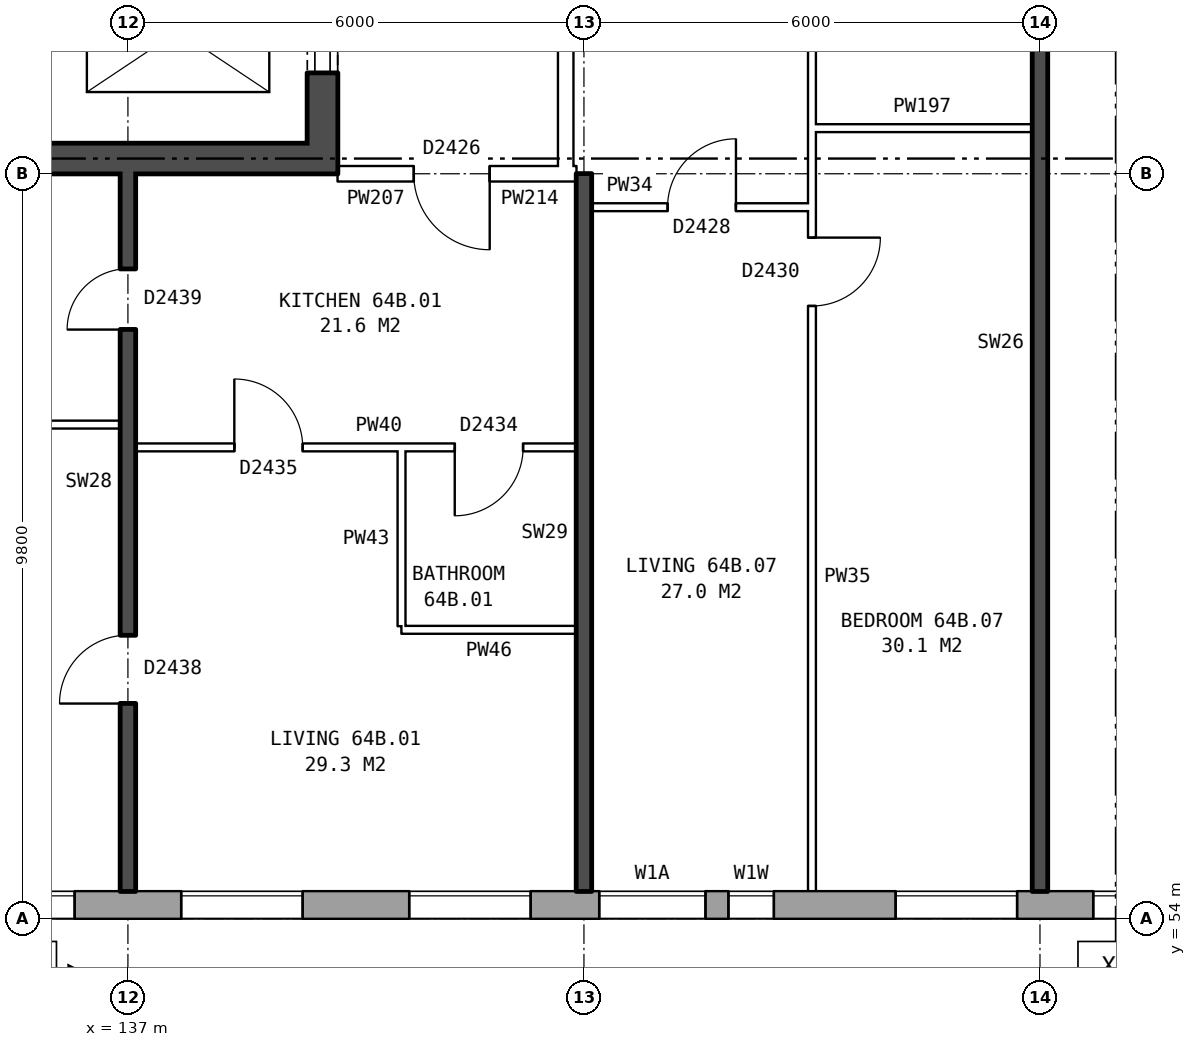
"""IFC4 building model, lengths in metres.
Left out: names, types, materials, properties, quantities, classifications, styles, units other than length and angle.
Written with IfcOpenShell. Run it as: python <this file> out.ifc"""

import sys

from ifc_helpers import new_model, si_unit, direction, frame, frame_2d, origin, place, context, subcontext, project, spatial, rectangle, extrude, element, fill, save


model = new_model("IFC4")
c1 = context("Model", 3, precision=1e-05, world=origin(), true_north=direction((0.0, 1.0)))
c2 = subcontext(c1, "Body", "Model", "MODEL_VIEW")
j1 = project(units=[si_unit("LENGTHUNIT", "METRE"), si_unit("PLANEANGLEUNIT", "RADIAN")], contexts=[c1])
p1 = place(None, origin())
s1 = spatial("IfcSite", under=j1, at=p1, CompositionType="ELEMENT")
p2 = place(p1, origin())
s2 = spatial("IfcBuilding", under=s1, at=p2, CompositionType="ELEMENT")
p3 = place(p2, frame((0.0, 0.0, 227.6)))
s3 = spatial("IfcBuildingStorey", under=s2, at=p3, CompositionType="ELEMENT", Elevation=227.6)
p4 = place(p3, frame((132.05, 54.18, 0.0), z_axis=(0.0, 0.0, 1.0), x_axis=(1.0, 0.0, 0.0)))
e1 = element("IfcWall", 1, at=p4, inside=s3, PredefinedType="STANDARD", context=c2, shape_type="SweptSolid", body=[
    extrude(rectangle(XDim=33.875, YDim=0.36, at=frame_2d((16.938, 0.0))), origin(), (0.0, 0.0, 1.0), 2.85),
])
p5 = place(p4, frame((2.65, 0.0, 0.8)))
e2 = element("IfcOpeningElement", 2, at=p5, cuts=e1, PredefinedType="OPENING", context=c2, shape_type="SweptSolid", body=[
    extrude(rectangle(XDim=1.6, YDim=1.8, at=frame_2d((0.8, 0.9))), frame((0.0, 0.19, 0.0), z_axis=(0.0, -1.0, 0.0), x_axis=(1.0, 0.0, 0.0)), (0.0, 0.0, 1.0), 0.38),
])
p6 = place(p4, frame((5.65, 0.0, 0.8)))
e3 = element("IfcOpeningElement", 3, at=p6, cuts=e1, PredefinedType="OPENING", context=c2, shape_type="SweptSolid", body=[
    extrude(rectangle(XDim=1.6, YDim=1.8, at=frame_2d((0.8, 0.9))), frame((0.0, 0.19, 0.0), z_axis=(0.0, -1.0, 0.0), x_axis=(1.0, 0.0, 0.0)), (0.0, 0.0, 1.0), 0.38),
])
p7 = place(p4, frame((8.65, 0.0, 0.8)))
e4 = element("IfcOpeningElement", 4, at=p7, cuts=e1, PredefinedType="OPENING", context=c2, shape_type="SweptSolid", body=[
    extrude(rectangle(XDim=1.6, YDim=1.8, at=frame_2d((0.8, 0.9))), frame((0.0, 0.19, 0.0), z_axis=(0.0, -1.0, 0.0), x_axis=(1.0, 0.0, 0.0)), (0.0, 0.0, 1.0), 0.38),
])
p8 = place(p4, frame((11.15, 0.0, 0.8)))
e5 = element("IfcOpeningElement", 5, at=p8, cuts=e1, PredefinedType="OPENING", context=c2, shape_type="SweptSolid", body=[
    extrude(rectangle(XDim=1.4, YDim=1.8, at=frame_2d((0.7, 0.9))), frame((0.0, 0.19, 0.0), z_axis=(0.0, -1.0, 0.0), x_axis=(1.0, 0.0, 0.0)), (0.0, 0.0, 1.0), 0.38),
])
p9 = place(p4, frame((15.05, 0.0, 0.8)))
e6 = element("IfcOpeningElement", 6, at=p9, cuts=e1, PredefinedType="OPENING", context=c2, shape_type="SweptSolid", body=[
    extrude(rectangle(XDim=1.6, YDim=1.8, at=frame_2d((0.8, 0.9))), frame((0.0, 0.19, 0.0), z_axis=(0.0, -1.0, 0.0), x_axis=(1.0, 0.0, 0.0)), (0.0, 0.0, 1.0), 0.38),
])
p10 = place(p4, frame((17.65, 0.0, 0.8)))
e7 = element("IfcOpeningElement", 7, at=p10, cuts=e1, PredefinedType="OPENING", context=c2, shape_type="SweptSolid", body=[
    extrude(rectangle(XDim=1.6, YDim=1.8, at=frame_2d((0.8, 0.9))), frame((0.0, 0.19, 0.0), z_axis=(0.0, -1.0, 0.0), x_axis=(1.0, 0.0, 0.0)), (0.0, 0.0, 1.0), 0.38),
])
p11 = place(p4, frame((20.1, 0.0, 0.35)))
e8 = element("IfcOpeningElement", 8, at=p11, cuts=e1, PredefinedType="OPENING", context=c2, shape_type="SweptSolid", body=[
    extrude(rectangle(XDim=1.0, YDim=1.8, at=frame_2d((0.5, 0.9))), frame((0.0, 0.19, 0.0), z_axis=(0.0, -1.0, 0.0), x_axis=(1.0, 0.0, 0.0)), (0.0, 0.0, 1.0), 0.38),
])
p12 = place(p4, frame((23.65, 0.0, 0.8)))
e9 = element("IfcOpeningElement", 9, at=p12, cuts=e1, PredefinedType="OPENING", context=c2, shape_type="SweptSolid", body=[
    extrude(rectangle(XDim=1.6, YDim=1.8, at=frame_2d((0.8, 0.9))), frame((0.0, 0.19, 0.0), z_axis=(0.0, -1.0, 0.0), x_axis=(1.0, 0.0, 0.0)), (0.0, 0.0, 1.0), 0.38),
])
p13 = place(p4, frame((26.65, 0.0, 0.8)))
e10 = element("IfcOpeningElement", 10, at=p13, cuts=e1, PredefinedType="OPENING", context=c2, shape_type="SweptSolid", body=[
    extrude(rectangle(XDim=1.6, YDim=1.8, at=frame_2d((0.8, 0.9))), frame((0.0, 0.19, 0.0), z_axis=(0.0, -1.0, 0.0), x_axis=(1.0, 0.0, 0.0)), (0.0, 0.0, 1.0), 0.38),
])
p14 = place(p4, frame((29.65, 0.0, 0.8)))
e11 = element("IfcOpeningElement", 11, at=p14, cuts=e1, PredefinedType="OPENING", context=c2, shape_type="SweptSolid", body=[
    extrude(rectangle(XDim=1.6, YDim=1.8, at=frame_2d((0.8, 0.9))), frame((0.0, 0.19, 0.0), z_axis=(0.0, -1.0, 0.0), x_axis=(1.0, 0.0, 0.0)), (0.0, 0.0, 1.0), 0.38),
])
p15 = place(p4, frame((12.85, 0.0, 1.7)))
e12 = element("IfcOpeningElement", 12, at=p15, cuts=e1, PredefinedType="OPENING", context=c2, shape_type="SweptSolid", body=[
    extrude(rectangle(XDim=0.6, YDim=0.9, at=frame_2d((0.3, 0.45))), frame((0.0, 0.19, 0.0), z_axis=(0.0, -1.0, 0.0), x_axis=(1.0, 0.0, 0.0)), (0.0, 0.0, 1.0), 0.38),
])
p16 = place(p3, frame((139.56, 63.8, 0.0), z_axis=(0.0, 0.0, 1.0), x_axis=(0.0, 1.0, 0.0)))
e13 = element("IfcWall", 13, at=p16, inside=s3, PredefinedType="SHEAR", context=c2, shape_type="SweptSolid", body=[
    extrude(rectangle(XDim=12.4, YDim=0.4, at=frame_2d((6.2, 0.0))), origin(), (0.0, 0.0, 1.0), 2.85),
])
p17 = place(p16, frame((1.325, 0.0, 0.0)))
e14 = element("IfcOpeningElement", 14, at=p17, cuts=e13, PredefinedType="OPENING", context=c2, shape_type="SweptSolid", body=[
    extrude(rectangle(XDim=1.1, YDim=2.1, at=frame_2d((0.55, 1.05))), frame((0.0, 0.21, 0.0), z_axis=(0.0, -1.0, 0.0), x_axis=(1.0, 0.0, 0.0)), (0.0, 0.0, 1.0), 0.42),
])
p18 = place(p16, frame((3.6, 0.0, 0.0)))
e15 = element("IfcOpeningElement", 15, at=p18, cuts=e13, PredefinedType="OPENING", context=c2, shape_type="SweptSolid", body=[
    extrude(rectangle(XDim=1.1, YDim=2.1, at=frame_2d((0.55, 1.05))), frame((0.0, 0.21, 0.0), z_axis=(0.0, -1.0, 0.0), x_axis=(1.0, 0.0, 0.0)), (0.0, 0.0, 1.0), 0.42),
])
p19 = place(p16, frame((5.8, 0.0, 0.0)))
e16 = element("IfcOpeningElement", 16, at=p19, cuts=e13, PredefinedType="OPENING", context=c2, shape_type="SweptSolid", body=[
    extrude(rectangle(XDim=1.1, YDim=2.1, at=frame_2d((0.55, 1.05))), frame((0.0, 0.21, 0.0), z_axis=(0.0, -1.0, 0.0), x_axis=(1.0, 0.0, 0.0)), (0.0, 0.0, 1.0), 0.42),
])
p20 = place(p16, frame((9.9, 0.0, 0.0)))
e17 = element("IfcOpeningElement", 17, at=p20, cuts=e13, PredefinedType="OPENING", context=c2, shape_type="SweptSolid", body=[
    extrude(rectangle(XDim=1.1, YDim=2.1, at=frame_2d((0.55, 1.05))), frame((0.0, 0.21, 0.0), z_axis=(0.0, -1.0, 0.0), x_axis=(1.0, 0.0, 0.0)), (0.0, 0.0, 1.0), 0.42),
])
p21 = place(p16, frame((8.125, 0.0, 0.0)))
e18 = element("IfcOpeningElement", 18, at=p21, cuts=e13, PredefinedType="OPENING", context=c2, shape_type="SweptSolid", body=[
    extrude(rectangle(XDim=0.85, YDim=2.1, at=frame_2d((0.425, 1.05))), frame((0.0, 0.21, 0.0), z_axis=(0.0, -1.0, 0.0), x_axis=(1.0, 0.0, 0.0)), (0.0, 0.0, 1.0), 0.42),
])
p22 = place(p3, frame((139.36, 64.0, 0.0), z_axis=(0.0, 0.0, 1.0), x_axis=(-1.0, 0.0, 0.0)))
e19 = element("IfcWall", 19, at=p22, inside=s3, PredefinedType="SHEAR", context=c2, shape_type="SweptSolid", body=[
    extrude(rectangle(XDim=7.6, YDim=0.4, at=frame_2d((3.8, 0.0))), origin(), (0.0, 0.0, 1.0), 2.85),
])
p23 = place(p3, frame((142.76, 63.9, 0.0), z_axis=(0.0, 0.0, 1.0), x_axis=(0.0, 1.0, 0.0)))
e20 = element("IfcWall", 20, at=p23, inside=s3, PredefinedType="PARTITIONING", context=c2, shape_type="SweptSolid", body=[
    extrude(rectangle(XDim=12.2, YDim=0.2, at=frame_2d((6.1, 0.0))), origin(), (0.0, 0.0, 1.0), 2.85),
])
p24 = place(p23, frame((5.1, 0.0, 0.0)))
e21 = element("IfcOpeningElement", 21, at=p24, cuts=e20, PredefinedType="OPENING", context=c2, shape_type="SweptSolid", body=[
    extrude(rectangle(XDim=2.0, YDim=2.1, at=frame_2d((1.0, 1.05))), frame((0.0, 0.11, 0.0), z_axis=(0.0, -1.0, 0.0), x_axis=(1.0, 0.0, 0.0)), (0.0, 0.0, 1.0), 0.22),
])
p25 = place(p3, frame((140.6, 57.8, 0.0), z_axis=(0.0, 0.0, 1.0), x_axis=(1.0, 0.0, 0.0)))
e22 = element("IfcWall", 22, at=p25, inside=s3, PredefinedType="PARTITIONING", context=c2, shape_type="SweptSolid", body=[
    extrude(rectangle(XDim=2.3, YDim=0.1, at=frame_2d((1.15, 0.0))), origin(), (0.0, 0.0, 1.0), 2.85),
])
p26 = place(p3, frame((137.1, 60.2, 0.0), z_axis=(0.0, 0.0, 1.0), x_axis=(1.0, 0.0, 0.0)))
e23 = element("IfcWall", 23, at=p26, inside=s3, PredefinedType="PARTITIONING", context=c2, shape_type="SweptSolid", body=[
    extrude(rectangle(XDim=5.8, YDim=0.1, at=frame_2d((2.9, 0.0))), origin(), (0.0, 0.0, 1.0), 2.85),
])
p27 = place(p26, frame((1.3, 0.0, 0.0)))
e24 = element("IfcOpeningElement", 24, at=p27, cuts=e23, PredefinedType="OPENING", context=c2, shape_type="SweptSolid", body=[
    extrude(rectangle(XDim=0.9, YDim=2.1, at=frame_2d((0.45, 1.05))), frame((0.0, 0.06, 0.0), z_axis=(0.0, -1.0, 0.0), x_axis=(1.0, 0.0, 0.0)), (0.0, 0.0, 1.0), 0.12),
])
p28 = place(p26, frame((4.2, 0.0, 0.0)))
e25 = element("IfcOpeningElement", 25, at=p28, cuts=e23, PredefinedType="OPENING", context=c2, shape_type="SweptSolid", body=[
    extrude(rectangle(XDim=0.9, YDim=2.1, at=frame_2d((0.45, 1.05))), frame((0.0, 0.06, 0.0), z_axis=(0.0, -1.0, 0.0), x_axis=(1.0, 0.0, 0.0)), (0.0, 0.0, 1.0), 0.12),
])
p29 = place(p3, frame((131.1, 60.5, 0.0), z_axis=(0.0, 0.0, 1.0), x_axis=(1.0, 0.0, 0.0)))
e26 = element("IfcWall", 26, at=p29, inside=s3, PredefinedType="PARTITIONING", context=c2, shape_type="SweptSolid", body=[
    extrude(rectangle(XDim=5.8, YDim=0.1, at=frame_2d((2.9, 0.0))), origin(), (0.0, 0.0, 1.0), 2.85),
])
p30 = place(p3, frame((143.1, 63.36, 0.0), z_axis=(0.0, 0.0, 1.0), x_axis=(1.0, 0.0, 0.0)))
e27 = element("IfcWall", 27, at=p30, inside=s3, PredefinedType="PARTITIONING", context=c2, shape_type="SweptSolid", body=[
    extrude(rectangle(XDim=2.9, YDim=0.1, at=frame_2d((1.45, 0.0))), origin(), (0.0, 0.0, 1.0), 2.85),
])
p31 = place(p30, frame((1.0, 0.0, 0.0)))
e28 = element("IfcOpeningElement", 28, at=p31, cuts=e27, PredefinedType="OPENING", context=c2, shape_type="SweptSolid", body=[
    extrude(rectangle(XDim=0.9, YDim=2.1, at=frame_2d((0.45, 1.05))), frame((0.0, 0.06, 0.0), z_axis=(0.0, -1.0, 0.0), x_axis=(1.0, 0.0, 0.0)), (0.0, 0.0, 1.0), 0.12),
])
p32 = place(p3, frame((139.76, 63.8, 0.0), z_axis=(0.0, 0.0, 1.0), x_axis=(1.0, 0.0, 0.0)))
e29 = element("IfcWall", 29, at=p32, inside=s3, PredefinedType="PARTITIONING", context=c2, shape_type="SweptSolid", body=[
    extrude(rectangle(XDim=3.0, YDim=0.2, at=frame_2d((1.5, 0.0))), origin(), (0.0, 0.0, 1.0), 2.85),
])
p33 = place(p32, frame((1.0, 0.0, 0.0)))
e30 = element("IfcOpeningElement", 30, at=p33, cuts=e29, PredefinedType="OPENING", context=c2, shape_type="SweptSolid", body=[
    extrude(rectangle(XDim=1.0, YDim=2.1, at=frame_2d((0.5, 1.05))), frame((0.0, 0.11, 0.0), z_axis=(0.0, -1.0, 0.0), x_axis=(1.0, 0.0, 0.0)), (0.0, 0.0, 1.0), 0.22),
])
p34 = place(p3, frame((142.76, 63.8, 0.0), z_axis=(0.0, 0.0, 1.0), x_axis=(1.0, 0.0, 0.0)))
e31 = element("IfcWall", 31, at=p34, inside=s3, PredefinedType="PARTITIONING", context=c2, shape_type="SweptSolid", body=[
    extrude(rectangle(XDim=0.14, YDim=0.2, at=frame_2d((0.07, 0.0))), origin(), (0.0, 0.0, 1.0), 2.85),
])
p35 = place(p3, frame((146.0, 64.4, 0.0), z_axis=(0.0, 0.0, 1.0), x_axis=(1.0, 0.0, 0.0)))
e32 = element("IfcWall", 32, at=p35, inside=s3, PredefinedType="PARTITIONING", context=c2, shape_type="SweptSolid", body=[
    extrude(rectangle(XDim=2.9, YDim=0.1, at=frame_2d((1.45, 0.0))), origin(), (0.0, 0.0, 1.0), 2.85),
])
p36 = place(p3, frame((137.0, 54.36, 0.0), z_axis=(0.0, 0.0, 1.0), x_axis=(0.0, 1.0, 0.0)))
e33 = element("IfcWall", 33, at=p36, inside=s3, PredefinedType="SOLIDWALL", context=c2, shape_type="SweptSolid", body=[
    extrude(rectangle(XDim=9.44, YDim=0.2, at=frame_2d((4.72, 0.0))), origin(), (0.0, 0.0, 1.0), 2.85),
])
p37 = place(p36, frame((2.47, 0.0, 0.0)))
e34 = element("IfcOpeningElement", 34, at=p37, cuts=e33, PredefinedType="OPENING", context=c2, shape_type="SweptSolid", body=[
    extrude(rectangle(XDim=0.9, YDim=2.1, at=frame_2d((0.45, 1.05))), frame((0.0, 0.11, 0.0), z_axis=(0.0, -1.0, 0.0), x_axis=(1.0, 0.0, 0.0)), (0.0, 0.0, 1.0), 0.22),
])
p38 = place(p36, frame((7.39, 0.0, 0.0)))
e35 = element("IfcOpeningElement", 35, at=p38, cuts=e33, PredefinedType="OPENING", context=c2, shape_type="SweptSolid", body=[
    extrude(rectangle(XDim=0.8, YDim=2.1, at=frame_2d((0.4, 1.05))), frame((0.0, 0.11, 0.0), z_axis=(0.0, -1.0, 0.0), x_axis=(1.0, 0.0, 0.0)), (0.0, 0.0, 1.0), 0.22),
])
p39 = place(p3, frame((140.6, 57.85, 0.0), z_axis=(0.0, 0.0, 1.0), x_axis=(0.0, 1.0, 0.0)))
e36 = element("IfcWall", 36, at=p39, inside=s3, PredefinedType="PARTITIONING", context=c2, shape_type="SweptSolid", body=[
    extrude(rectangle(XDim=2.3, YDim=0.1, at=frame_2d((1.15, 0.0))), origin(), (0.0, 0.0, 1.0), 2.85),
])
p40 = place(p3, frame((143.0, 54.36, 0.0), z_axis=(0.0, 0.0, 1.0), x_axis=(0.0, 1.0, 0.0)))
e37 = element("IfcWall", 37, at=p40, inside=s3, PredefinedType="SOLIDWALL", context=c2, shape_type="SweptSolid", body=[
    extrude(rectangle(XDim=9.44, YDim=0.2, at=frame_2d((4.72, 0.0))), origin(), (0.0, 0.0, 1.0), 2.85),
])
p41 = place(p3, frame((146.0, 54.36, 0.0), z_axis=(0.0, 0.0, 1.0), x_axis=(0.0, 1.0, 0.0)))
e38 = element("IfcWall", 38, at=p41, inside=s3, PredefinedType="PARTITIONING", context=c2, shape_type="SweptSolid", body=[
    extrude(rectangle(XDim=14.34, YDim=0.1, at=frame_2d((7.17, 0.0))), origin(), (0.0, 0.0, 1.0), 2.85),
])
p42 = place(p41, frame((7.7, 0.0, 0.0)))
e39 = element("IfcOpeningElement", 39, at=p42, cuts=e38, PredefinedType="OPENING", context=c2, shape_type="SweptSolid", body=[
    extrude(rectangle(XDim=0.9, YDim=2.1, at=frame_2d((0.45, 1.05))), frame((0.0, 0.06, 0.0), z_axis=(0.0, -1.0, 0.0), x_axis=(1.0, 0.0, 0.0)), (0.0, 0.0, 1.0), 0.12),
])
p43 = place(p41, frame((13.04, 0.0, 0.0)))
e40 = element("IfcOpeningElement", 40, at=p43, cuts=e38, PredefinedType="OPENING", context=c2, shape_type="SweptSolid", body=[
    extrude(rectangle(XDim=0.9, YDim=2.1, at=frame_2d((0.45, 1.05))), frame((0.0, 0.06, 0.0), z_axis=(0.0, -1.0, 0.0), x_axis=(1.0, 0.0, 0.0)), (0.0, 0.0, 1.0), 0.12),
])
p44 = place(p3, frame((149.0, 54.36, 0.0), z_axis=(0.0, 0.0, 1.0), x_axis=(0.0, 1.0, 0.0)))
e41 = element("IfcWall", 41, at=p44, inside=s3, PredefinedType="SOLIDWALL", context=c2, shape_type="SweptSolid", body=[
    extrude(rectangle(XDim=14.44, YDim=0.2, at=frame_2d((7.22, 0.0))), origin(), (0.0, 0.0, 1.0), 2.85),
])
p45 = place(p5, origin())
e42 = element("IfcWindow", 42, at=p45, inside=s3, PartitioningType="SINGLE_PANEL", PredefinedType="WINDOW", context=c2, shape_type="SweptSolid", body=[
    extrude(rectangle(XDim=1.6, YDim=1.8, at=frame_2d((0.8, 0.9))), frame((0.0, 0.15, 0.0), z_axis=(0.0, -1.0, 0.0), x_axis=(1.0, 0.0, 0.0)), (0.0, 0.0, 1.0), 0.06),
])
fill(e2, e42)
p46 = place(p6, origin())
e43 = element("IfcWindow", 43, at=p46, inside=s3, PartitioningType="SINGLE_PANEL", PredefinedType="WINDOW", context=c2, shape_type="SweptSolid", body=[
    extrude(rectangle(XDim=1.6, YDim=1.8, at=frame_2d((0.8, 0.9))), frame((0.0, 0.15, 0.0), z_axis=(0.0, -1.0, 0.0), x_axis=(1.0, 0.0, 0.0)), (0.0, 0.0, 1.0), 0.06),
])
fill(e3, e43)
p47 = place(p7, origin())
e44 = element("IfcWindow", 44, at=p47, inside=s3, PartitioningType="SINGLE_PANEL", PredefinedType="WINDOW", context=c2, shape_type="SweptSolid", body=[
    extrude(rectangle(XDim=1.6, YDim=1.8, at=frame_2d((0.8, 0.9))), frame((0.0, 0.15, 0.0), z_axis=(0.0, -1.0, 0.0), x_axis=(1.0, 0.0, 0.0)), (0.0, 0.0, 1.0), 0.06),
])
fill(e4, e44)
p48 = place(p8, origin())
e45 = element("IfcWindow", 45, at=p48, inside=s3, PartitioningType="SINGLE_PANEL", PredefinedType="WINDOW", context=c2, shape_type="SweptSolid", body=[
    extrude(rectangle(XDim=1.4, YDim=1.8, at=frame_2d((0.7, 0.9))), frame((0.0, 0.15, 0.0), z_axis=(0.0, -1.0, 0.0), x_axis=(1.0, 0.0, 0.0)), (0.0, 0.0, 1.0), 0.06),
])
fill(e5, e45)
p49 = place(p9, origin())
e46 = element("IfcWindow", 46, at=p49, inside=s3, PartitioningType="SINGLE_PANEL", PredefinedType="WINDOW", context=c2, shape_type="SweptSolid", body=[
    extrude(rectangle(XDim=1.6, YDim=1.8, at=frame_2d((0.8, 0.9))), frame((0.0, 0.15, 0.0), z_axis=(0.0, -1.0, 0.0), x_axis=(1.0, 0.0, 0.0)), (0.0, 0.0, 1.0), 0.06),
])
fill(e6, e46)
p50 = place(p10, origin())
e47 = element("IfcWindow", 47, at=p50, inside=s3, PartitioningType="SINGLE_PANEL", PredefinedType="WINDOW", context=c2, shape_type="SweptSolid", body=[
    extrude(rectangle(XDim=1.6, YDim=1.8, at=frame_2d((0.8, 0.9))), frame((0.0, 0.15, 0.0), z_axis=(0.0, -1.0, 0.0), x_axis=(1.0, 0.0, 0.0)), (0.0, 0.0, 1.0), 0.06),
])
fill(e7, e47)
p51 = place(p17, origin())
e48 = element("IfcDoor", 48, at=p51, inside=s3, OperationType="DOUBLE_DOOR_SLIDING", PredefinedType="DOOR", context=c2, shape_type="SweptSolid", body=[
    extrude(rectangle(XDim=1.1, YDim=2.1, at=frame_2d((0.55, 1.05))), frame((0.0, 0.185, 0.0), z_axis=(0.0, -1.0, 0.0), x_axis=(1.0, 0.0, 0.0)), (0.0, 0.0, 1.0), 0.05),
])
fill(e14, e48)
p52 = place(p37, origin())
e49 = element("IfcDoor", 49, at=p52, inside=s3, OperationType="SINGLE_SWING_LEFT", PredefinedType="DOOR", context=c2, shape_type="SweptSolid", body=[
    extrude(rectangle(XDim=0.9, YDim=2.1, at=frame_2d((0.45, 1.05))), frame((0.0, 0.025, 0.0), z_axis=(0.0, -1.0, 0.0), x_axis=(1.0, 0.0, 0.0)), (0.0, 0.0, 1.0), 0.05),
])
fill(e34, e49)
p53 = place(p33, frame((1.0, 0.0, 0.0), z_axis=(0.0, 0.0, 1.0), x_axis=(-1.0, 0.0, 0.0)))
e50 = element("IfcDoor", 50, at=p53, inside=s3, OperationType="SINGLE_SWING_LEFT", PredefinedType="DOOR", context=c2, shape_type="SweptSolid", body=[
    extrude(rectangle(XDim=1.0, YDim=2.1, at=frame_2d((0.5, 1.05))), frame((0.0, 0.025, 0.0), z_axis=(0.0, -1.0, 0.0), x_axis=(1.0, 0.0, 0.0)), (0.0, 0.0, 1.0), 0.05),
])
fill(e30, e50)
p54 = place(p27, origin())
e51 = element("IfcDoor", 51, at=p54, inside=s3, OperationType="SINGLE_SWING_LEFT", PredefinedType="DOOR", context=c2, shape_type="SweptSolid", body=[
    extrude(rectangle(XDim=0.9, YDim=2.1, at=frame_2d((0.45, 1.05))), frame((0.0, 0.025, 0.0), z_axis=(0.0, -1.0, 0.0), x_axis=(1.0, 0.0, 0.0)), (0.0, 0.0, 1.0), 0.05),
])
fill(e24, e51)
p55 = place(p38, origin())
e52 = element("IfcDoor", 52, at=p55, inside=s3, OperationType="SINGLE_SWING_LEFT", PredefinedType="DOOR", context=c2, shape_type="SweptSolid", body=[
    extrude(rectangle(XDim=0.8, YDim=2.1, at=frame_2d((0.4, 1.05))), frame((0.0, 0.025, 0.0), z_axis=(0.0, -1.0, 0.0), x_axis=(1.0, 0.0, 0.0)), (0.0, 0.0, 1.0), 0.05),
])
fill(e35, e52)
p56 = place(p28, frame((0.9, 0.0, 0.0), z_axis=(0.0, 0.0, 1.0), x_axis=(-1.0, 0.0, 0.0)))
e53 = element("IfcDoor", 53, at=p56, inside=s3, OperationType="SINGLE_SWING_RIGHT", PredefinedType="DOOR", context=c2, shape_type="SweptSolid", body=[
    extrude(rectangle(XDim=0.9, YDim=2.1, at=frame_2d((0.45, 1.05))), frame((0.0, 0.025, 0.0), z_axis=(0.0, -1.0, 0.0), x_axis=(1.0, 0.0, 0.0)), (0.0, 0.0, 1.0), 0.05),
])
fill(e25, e53)
p57 = place(p42, frame((0.9, 0.0, 0.0), z_axis=(0.0, 0.0, 1.0), x_axis=(-1.0, 0.0, 0.0)))
e54 = element("IfcDoor", 54, at=p57, inside=s3, OperationType="SINGLE_SWING_LEFT", PredefinedType="DOOR", context=c2, shape_type="SweptSolid", body=[
    extrude(rectangle(XDim=0.9, YDim=2.1, at=frame_2d((0.45, 1.05))), frame((0.0, 0.025, 0.0), z_axis=(0.0, -1.0, 0.0), x_axis=(1.0, 0.0, 0.0)), (0.0, 0.0, 1.0), 0.05),
])
fill(e39, e54)
p58 = place(p31, origin())
e55 = element("IfcDoor", 55, at=p58, inside=s3, OperationType="SINGLE_SWING_RIGHT", PredefinedType="DOOR", context=c2, shape_type="SweptSolid", body=[
    extrude(rectangle(XDim=0.9, YDim=2.1, at=frame_2d((0.45, 1.05))), frame((0.0, 0.025, 0.0), z_axis=(0.0, -1.0, 0.0), x_axis=(1.0, 0.0, 0.0)), (0.0, 0.0, 1.0), 0.05),
])
fill(e28, e55)
p59 = place(p15, origin())
e56 = element("IfcWindow", 56, at=p59, inside=s3, PartitioningType="SINGLE_PANEL", PredefinedType="WINDOW", context=c2, shape_type="SweptSolid", body=[
    extrude(rectangle(XDim=0.6, YDim=0.9, at=frame_2d((0.3, 0.45))), frame((0.0, 0.15, 0.0), z_axis=(0.0, -1.0, 0.0), x_axis=(1.0, 0.0, 0.0)), (0.0, 0.0, 1.0), 0.06),
])
fill(e12, e56)
save(model, sys.argv[1])
